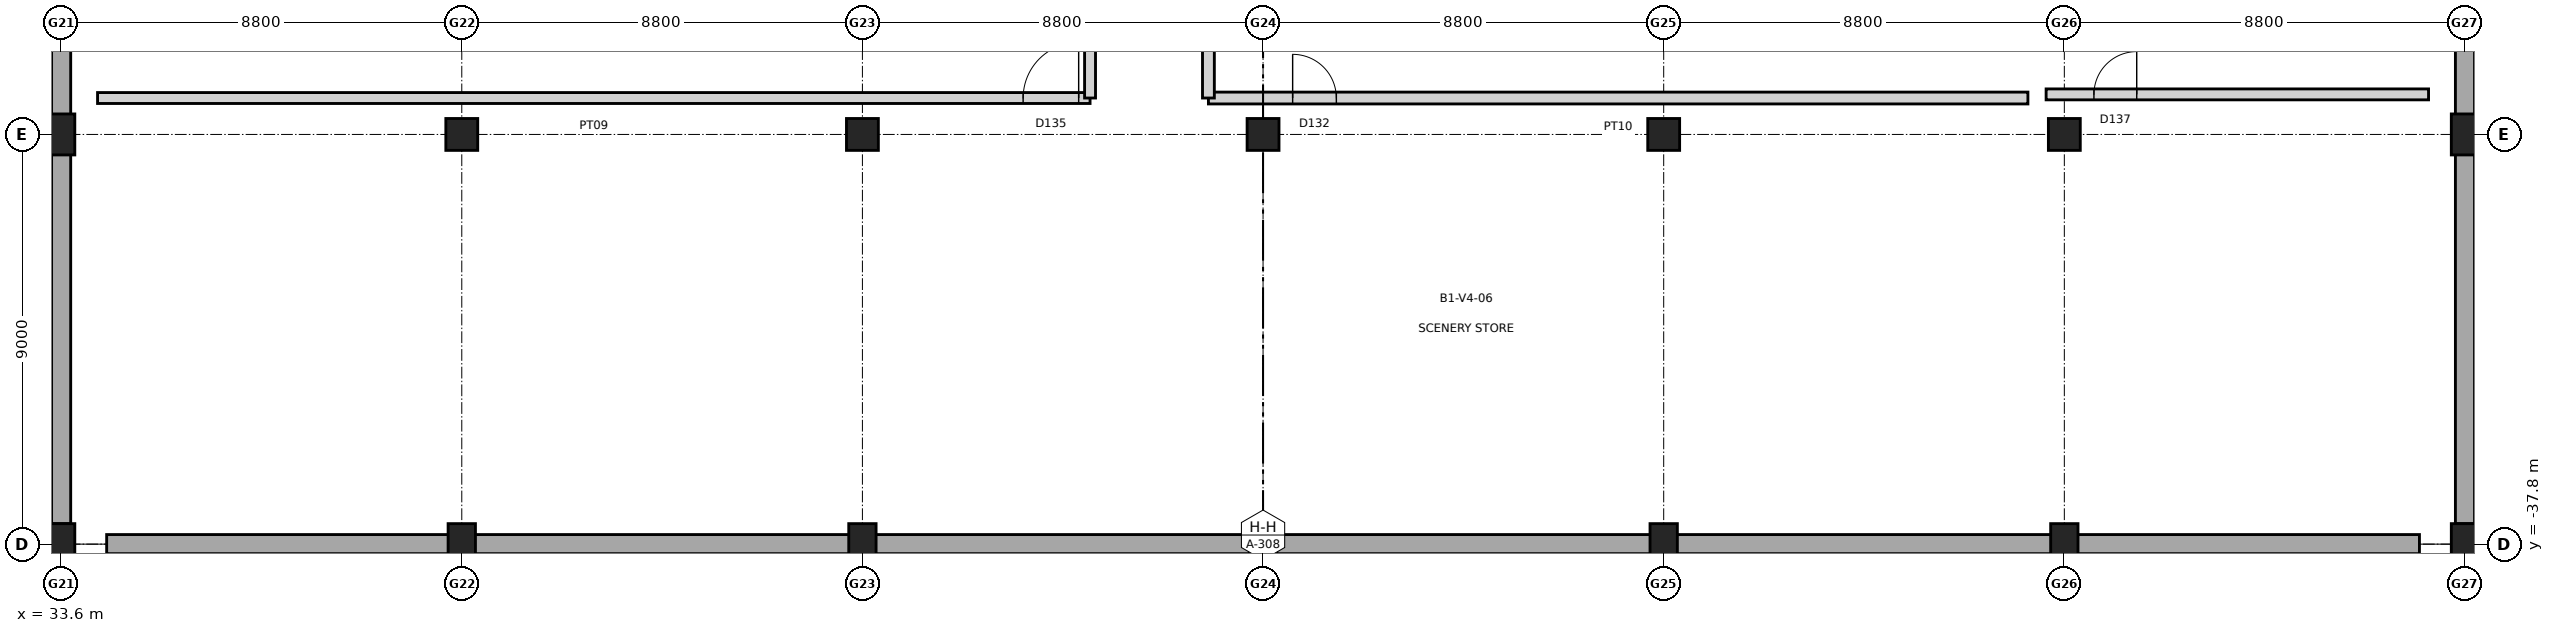
"""IFC4 building model, lengths in metres.
Left out: names, types, materials, properties, quantities, classifications, styles, units other than length and angle.
Written with IfcOpenShell. Run it as: python <this file> out.ifc"""

import sys

from ifc_helpers import new_model, si_unit, direction, frame, frame_2d, origin, origin_2d, place, context, subcontext, project, spatial, rectangle, extrude, element, fill, save


model = new_model("IFC4")
c1 = context("Model", 3, precision=1e-05, world=origin(), true_north=direction((0.0, 1.0)))
c2 = subcontext(c1, "Body", "Model", "MODEL_VIEW")
j1 = project(units=[si_unit("LENGTHUNIT", "METRE"), si_unit("PLANEANGLEUNIT", "RADIAN")], contexts=[c1])
p1 = place(None, origin())
s1 = spatial("IfcSite", under=j1, at=p1, CompositionType="ELEMENT")
p2 = place(p1, origin())
s2 = spatial("IfcBuilding", under=s1, at=p2, CompositionType="ELEMENT")
p3 = place(p2, frame((0.0, 0.0, -5.4)))
s3 = spatial("IfcBuildingStorey", under=s2, at=p3, CompositionType="ELEMENT", Elevation=-5.4)
for number, where, z_axis, x_axis in (
    (1, (33.6, -37.8, 0.0), (0.0, 0.0, 1.0), (1.0, 0.0, 0.0)),
    (2, (33.6, -28.8, 0.0), (0.0, 0.0, 1.0), (1.0, 0.0, 0.0)),
    (3, (42.4, -37.8, 0.0), (0.0, 0.0, 1.0), (1.0, 0.0, 0.0)),
):
    element("IfcColumn", number, at=place(p3, frame(where, z_axis=z_axis, x_axis=x_axis)), inside=s3, PredefinedType="COLUMN", context=c2, shape_type="SweptSolid", body=[
        extrude(rectangle(XDim=0.6, YDim=0.9, at=origin_2d()), origin(), (0.0, 0.0, 1.0), 5.4),
    ])
p4 = place(p3, frame((42.4, -28.8, 0.0), z_axis=(0.0, 0.0, 1.0), x_axis=(1.0, 0.0, 0.0)))
e4 = element("IfcColumn", 4, at=p4, inside=s3, PredefinedType="COLUMN", context=c2, shape_type="SweptSolid", body=[
    extrude(rectangle(XDim=0.7, YDim=0.7, at=origin_2d()), origin(), (0.0, 0.0, 1.0), 5.4),
])
p5 = place(p3, frame((51.2, -37.8, 0.0), z_axis=(0.0, 0.0, 1.0), x_axis=(1.0, 0.0, 0.0)))
e5 = element("IfcColumn", 5, at=p5, inside=s3, PredefinedType="COLUMN", context=c2, shape_type="SweptSolid", body=[
    extrude(rectangle(XDim=0.6, YDim=0.9, at=origin_2d()), origin(), (0.0, 0.0, 1.0), 5.4),
])
p6 = place(p3, frame((51.2, -28.8, 0.0), z_axis=(0.0, 0.0, 1.0), x_axis=(1.0, 0.0, 0.0)))
e6 = element("IfcColumn", 6, at=p6, inside=s3, PredefinedType="COLUMN", context=c2, shape_type="SweptSolid", body=[
    extrude(rectangle(XDim=0.7, YDim=0.7, at=origin_2d()), origin(), (0.0, 0.0, 1.0), 5.4),
])
p7 = place(p3, frame((60.0, -37.8, 0.0), z_axis=(0.0, 0.0, 1.0), x_axis=(1.0, 0.0, 0.0)))
e7 = element("IfcColumn", 7, at=p7, inside=s3, PredefinedType="COLUMN", context=c2, shape_type="SweptSolid", body=[
    extrude(rectangle(XDim=0.6, YDim=0.9, at=origin_2d()), origin(), (0.0, 0.0, 1.0), 5.4),
])
p8 = place(p3, frame((60.0, -28.8, 0.0), z_axis=(0.0, 0.0, 1.0), x_axis=(1.0, 0.0, 0.0)))
e8 = element("IfcColumn", 8, at=p8, inside=s3, PredefinedType="COLUMN", context=c2, shape_type="SweptSolid", body=[
    extrude(rectangle(XDim=0.7, YDim=0.7, at=origin_2d()), origin(), (0.0, 0.0, 1.0), 5.4),
])
p9 = place(p3, frame((68.8, -37.8, 0.0), z_axis=(0.0, 0.0, 1.0), x_axis=(1.0, 0.0, 0.0)))
e9 = element("IfcColumn", 9, at=p9, inside=s3, PredefinedType="COLUMN", context=c2, shape_type="SweptSolid", body=[
    extrude(rectangle(XDim=0.6, YDim=0.9, at=origin_2d()), origin(), (0.0, 0.0, 1.0), 5.4),
])
p10 = place(p3, frame((68.8, -28.8, 0.0), z_axis=(0.0, 0.0, 1.0), x_axis=(1.0, 0.0, 0.0)))
e10 = element("IfcColumn", 10, at=p10, inside=s3, PredefinedType="COLUMN", context=c2, shape_type="SweptSolid", body=[
    extrude(rectangle(XDim=0.7, YDim=0.7, at=origin_2d()), origin(), (0.0, 0.0, 1.0), 5.4),
])
p11 = place(p3, frame((77.6, -37.8, 0.0), z_axis=(0.0, 0.0, 1.0), x_axis=(1.0, 0.0, 0.0)))
e11 = element("IfcColumn", 11, at=p11, inside=s3, PredefinedType="COLUMN", context=c2, shape_type="SweptSolid", body=[
    extrude(rectangle(XDim=0.6, YDim=0.9, at=origin_2d()), origin(), (0.0, 0.0, 1.0), 5.4),
])
p12 = place(p3, frame((77.6, -28.8, 0.0), z_axis=(0.0, 0.0, 1.0), x_axis=(1.0, 0.0, 0.0)))
e12 = element("IfcColumn", 12, at=p12, inside=s3, PredefinedType="COLUMN", context=c2, shape_type="SweptSolid", body=[
    extrude(rectangle(XDim=0.7, YDim=0.7, at=origin_2d()), origin(), (0.0, 0.0, 1.0), 5.4),
])
for number, where, z_axis, x_axis in (
    (13, (86.4, -37.8, 0.0), (0.0, 0.0, 1.0), (1.0, 0.0, 0.0)),
    (14, (86.4, -28.8, 0.0), (0.0, 0.0, 1.0), (1.0, 0.0, 0.0)),
):
    element("IfcColumn", number, at=place(p3, frame(where, z_axis=z_axis, x_axis=x_axis)), inside=s3, PredefinedType="COLUMN", context=c2, shape_type="SweptSolid", body=[
        extrude(rectangle(XDim=0.6, YDim=0.9, at=origin_2d()), origin(), (0.0, 0.0, 1.0), 5.4),
    ])
for number, where, z_axis, x_axis in (
    (15, (33.6, -37.35, 0.0), (0.0, 0.0, 1.0), (0.0, 1.0, 0.0)),
    (16, (86.4, -37.35, 0.0), (0.0, 0.0, 1.0), (0.0, 1.0, 0.0)),
):
    element("IfcWall", number, at=place(p3, frame(where, z_axis=z_axis, x_axis=x_axis)), inside=s3, PredefinedType="USERDEFINED", context=c2, shape_type="SweptSolid", body=[
        extrude(rectangle(XDim=70.5, YDim=0.42, at=frame_2d((35.25, 0.0))), origin(), (0.0, 0.0, 1.0), 5.11),
    ])
p13 = place(p3, frame((34.6, -37.8, 0.0), z_axis=(0.0, 0.0, 1.0), x_axis=(1.0, 0.0, 0.0)))
e17 = element("IfcWall", 17, at=p13, inside=s3, PredefinedType="USERDEFINED", context=c2, shape_type="SweptSolid", body=[
    extrude(rectangle(XDim=50.8, YDim=0.42, at=frame_2d((25.4, 0.0))), origin(), (0.0, 0.0, 1.0), 5.11),
])
p14 = place(p3, frame((34.4, -28.0, 0.0), z_axis=(0.0, 0.0, 1.0), x_axis=(1.0, 0.0, 0.0)))
e18 = element("IfcWall", 18, at=p14, inside=s3, PredefinedType="PARTITIONING", context=c2, shape_type="SweptSolid", body=[
    extrude(rectangle(XDim=21.8, YDim=0.24, at=frame_2d((10.9, 0.0))), origin(), (0.0, 0.0, 1.0), 5.02),
])
p15 = place(p14, frame((20.33, 0.0, 0.0)))
e19 = element("IfcOpeningElement", 19, at=p15, cuts=e18, PredefinedType="OPENING", context=c2, shape_type="SweptSolid", body=[
    extrude(rectangle(XDim=1.22, YDim=2.3, at=frame_2d((0.61, 1.15))), frame((0.0, 0.13, 0.0), z_axis=(0.0, -1.0, 0.0), x_axis=(1.0, 0.0, 0.0)), (0.0, 0.0, 1.0), 0.26),
])
p16 = place(p3, frame((56.2, -28.0, 0.0), z_axis=(0.0, 0.0, 1.0), x_axis=(0.0, 1.0, 0.0)))
e20 = element("IfcWall", 20, at=p16, inside=s3, PredefinedType="PARTITIONING", context=c2, shape_type="SweptSolid", body=[
    extrude(rectangle(XDim=23.6, YDim=0.24, at=frame_2d((11.8, 0.0))), origin(), (0.0, 0.0, 1.0), 5.02),
])
p17 = place(p3, frame((58.8, -28.0, 0.0), z_axis=(0.0, 0.0, 1.0), x_axis=(1.0, 0.0, 0.0)))
e21 = element("IfcWall", 21, at=p17, inside=s3, PredefinedType="PARTITIONING", context=c2, shape_type="SweptSolid", body=[
    extrude(rectangle(XDim=18.0, YDim=0.26, at=frame_2d((9.0, 0.0))), origin(), (0.0, 0.0, 1.0), 5.02),
])
p18 = place(p17, frame((1.85, 0.0, 0.0)))
e22 = element("IfcOpeningElement", 22, at=p18, cuts=e21, PredefinedType="OPENING", context=c2, shape_type="SweptSolid", body=[
    extrude(rectangle(XDim=0.96, YDim=2.2, at=frame_2d((0.48, 1.1))), frame((0.0, 0.14, 0.0), z_axis=(0.0, -1.0, 0.0), x_axis=(1.0, 0.0, 0.0)), (0.0, 0.0, 1.0), 0.28),
])
p19 = place(p3, frame((58.8, -28.0, 0.0), z_axis=(0.0, 0.0, 1.0), x_axis=(0.0, 1.0, 0.0)))
e23 = element("IfcWall", 23, at=p19, inside=s3, PredefinedType="PARTITIONING", context=c2, shape_type="SweptSolid", body=[
    extrude(rectangle(XDim=23.6, YDim=0.26, at=frame_2d((11.8, 0.0))), origin(), (0.0, 0.0, 1.0), 5.02),
])
p20 = place(p3, frame((77.2, -27.92, 0.0), z_axis=(0.0, 0.0, 1.0), x_axis=(1.0, 0.0, 0.0)))
e24 = element("IfcWall", 24, at=p20, inside=s3, PredefinedType="PARTITIONING", context=c2, shape_type="SweptSolid", body=[
    extrude(rectangle(XDim=8.4, YDim=0.24, at=frame_2d((4.2, 0.0))), origin(), (0.0, 0.0, 1.0), 5.02),
])
p21 = place(p20, frame((1.05, 0.0, 0.0)))
e25 = element("IfcOpeningElement", 25, at=p21, cuts=e24, PredefinedType="OPENING", context=c2, shape_type="SweptSolid", body=[
    extrude(rectangle(XDim=0.94, YDim=2.1, at=frame_2d((0.47, 1.05))), frame((0.0, 0.13, 0.0), z_axis=(0.0, -1.0, 0.0), x_axis=(1.0, 0.0, 0.0)), (0.0, 0.0, 1.0), 0.26),
])
p22 = place(p18, origin())
e26 = element("IfcDoor", 26, at=p22, inside=s3, OperationType="SINGLE_SWING_LEFT", PredefinedType="DOOR", context=c2, shape_type="SweptSolid", body=[
    extrude(rectangle(XDim=0.96, YDim=2.2, at=frame_2d((0.48, 1.1))), frame((0.0, 0.025, 0.0), z_axis=(0.0, -1.0, 0.0), x_axis=(1.0, 0.0, 0.0)), (0.0, 0.0, 1.0), 0.05),
])
fill(e22, e26)
p23 = place(p15, origin())
e27 = element("IfcDoor", 27, at=p23, inside=s3, OperationType="SINGLE_SWING_RIGHT", PredefinedType="DOOR", context=c2, shape_type="SweptSolid", body=[
    extrude(rectangle(XDim=1.22, YDim=2.3, at=frame_2d((0.61, 1.15))), frame((0.0, 0.025, 0.0), z_axis=(0.0, -1.0, 0.0), x_axis=(1.0, 0.0, 0.0)), (0.0, 0.0, 1.0), 0.05),
])
fill(e19, e27)
p24 = place(p21, origin())
e28 = element("IfcDoor", 28, at=p24, inside=s3, OperationType="SINGLE_SWING_RIGHT", PredefinedType="DOOR", context=c2, shape_type="SweptSolid", body=[
    extrude(rectangle(XDim=0.94, YDim=2.1, at=frame_2d((0.47, 1.05))), frame((0.0, 0.025, 0.0), z_axis=(0.0, -1.0, 0.0), x_axis=(1.0, 0.0, 0.0)), (0.0, 0.0, 1.0), 0.05),
])
fill(e25, e28)
save(model, sys.argv[1])
